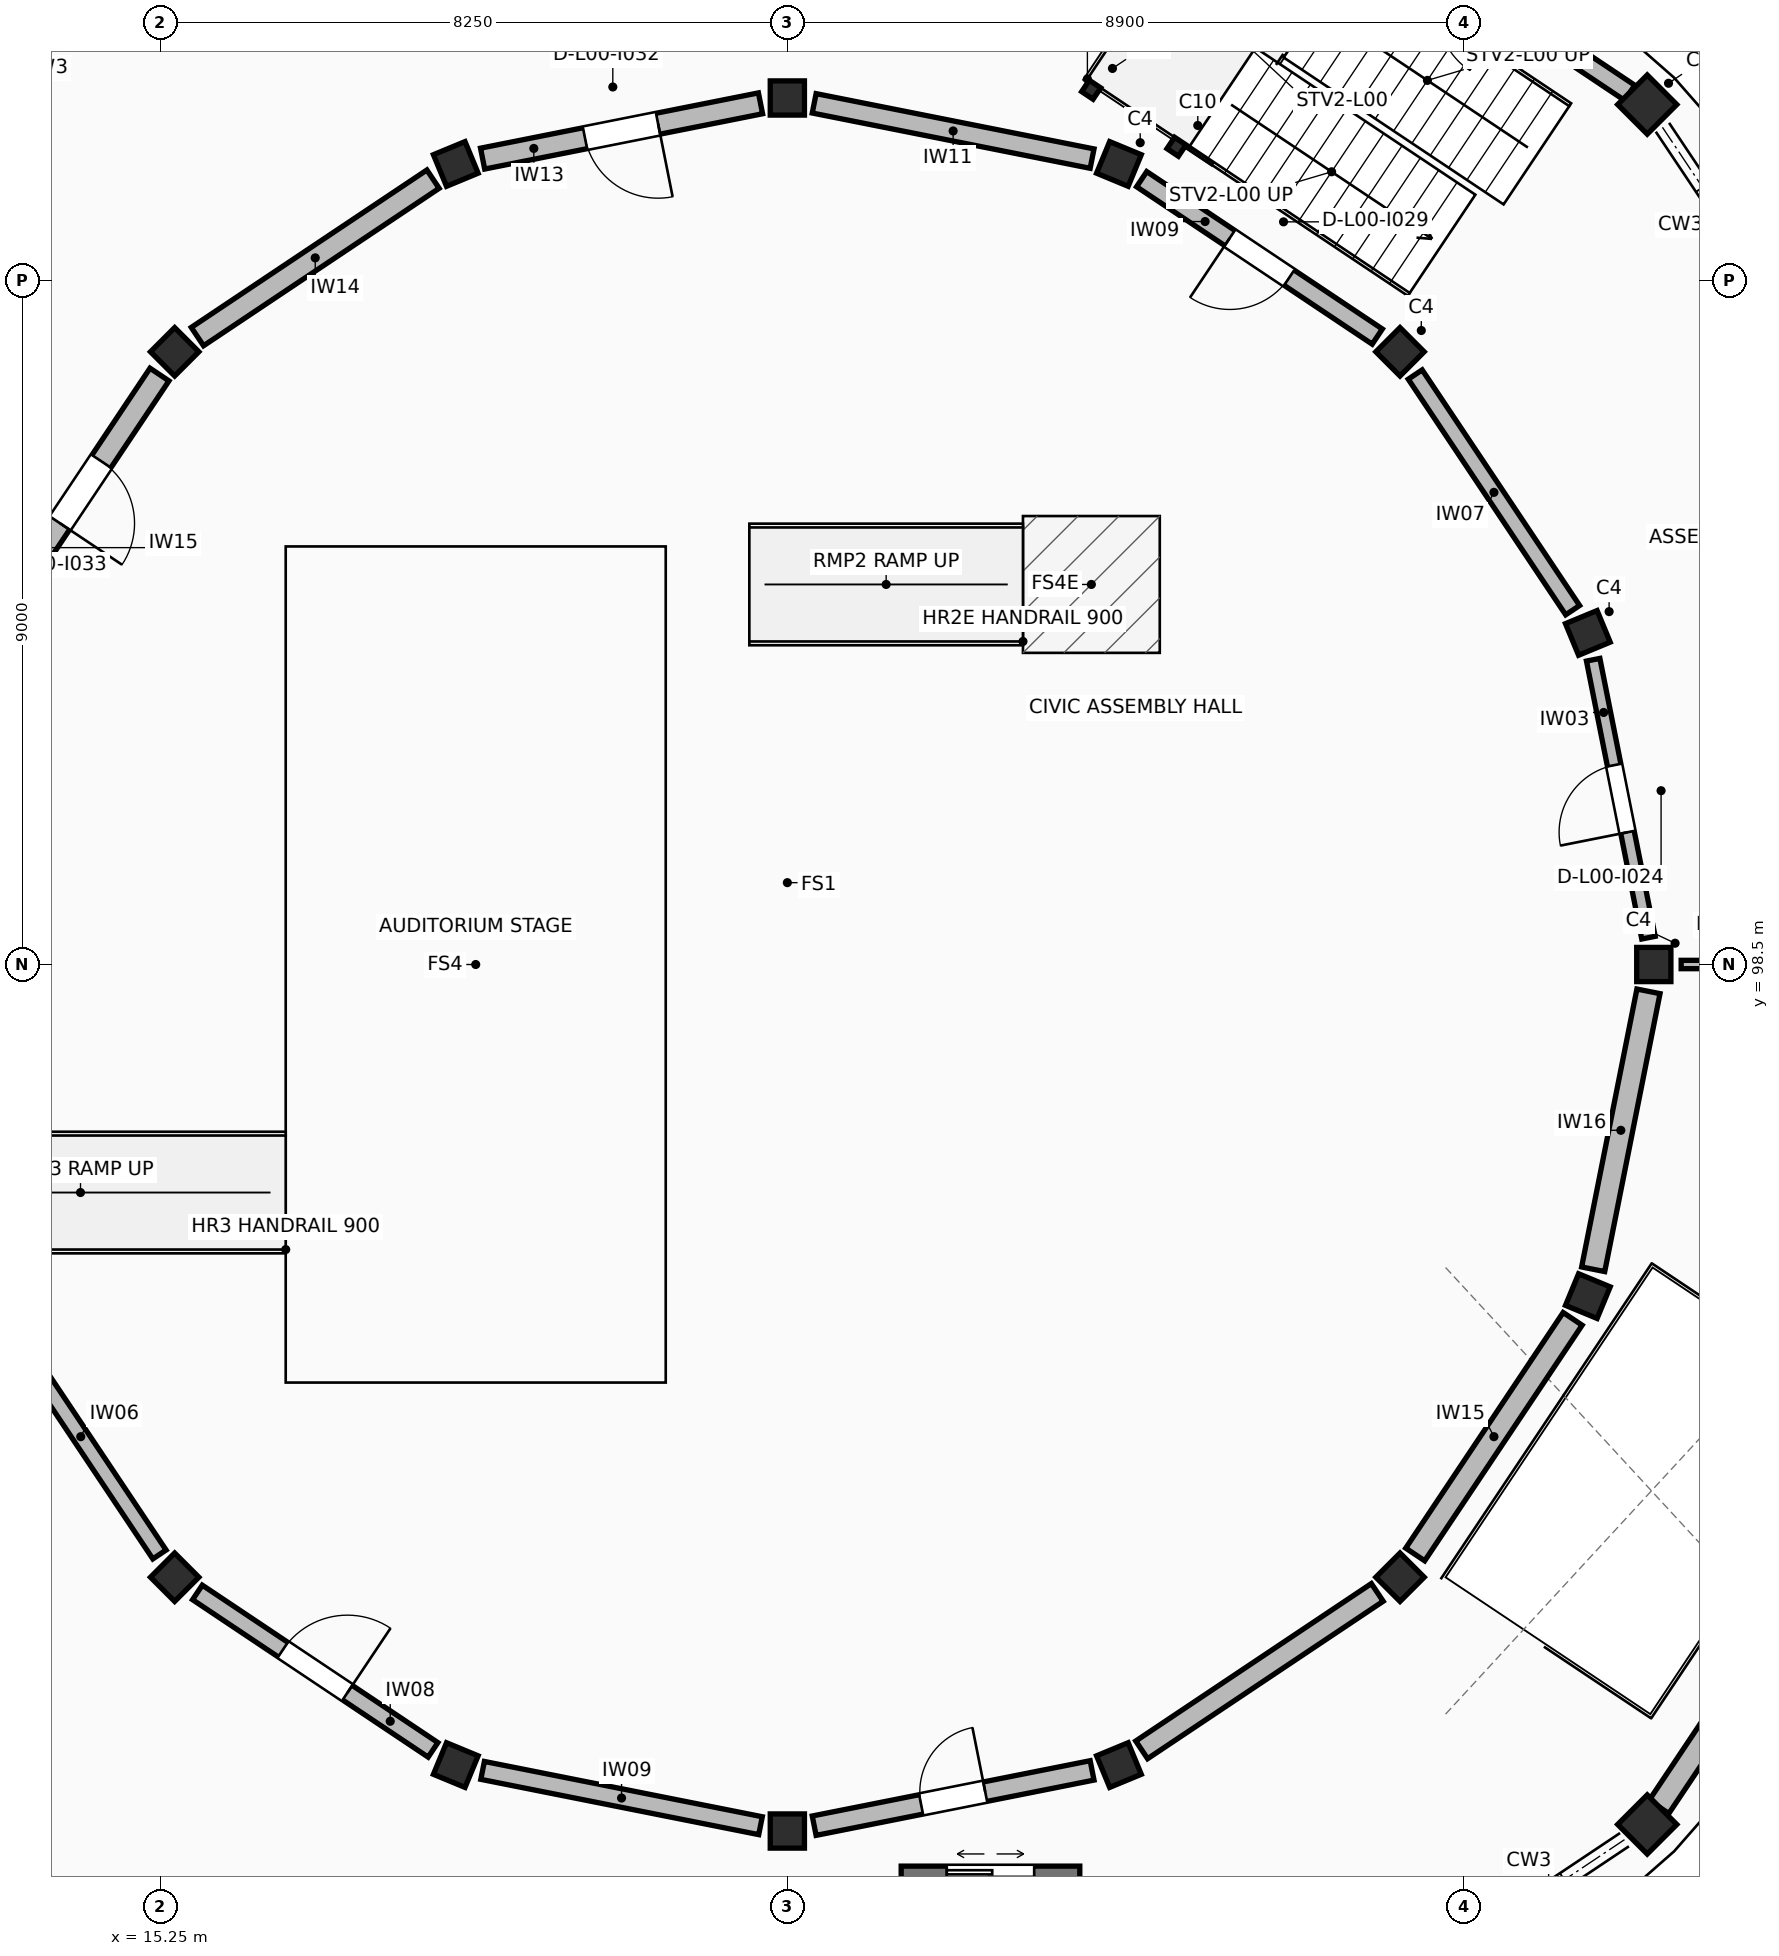
"""IFC4 building model, lengths in metres.
Left out: names, types, materials, properties, quantities, classifications, styles, units other than length and angle.
Written with IfcOpenShell. Run it as: python <this file> out.ifc"""

import sys

from ifc_helpers import new_model, si_unit, direction, frame, frame_2d, origin, origin_2d, place, context, subcontext, project, spatial, rectangle, hollow_rectangle, extrude, element, fill, save


model = new_model("IFC4")
c1 = context("Model", 3, precision=1e-05, world=origin(), true_north=direction((0.0, 1.0)))
c2 = subcontext(c1, "Body", "Model", "MODEL_VIEW")
j1 = project(units=[si_unit("LENGTHUNIT", "METRE"), si_unit("PLANEANGLEUNIT", "RADIAN")], contexts=[c1])
p1 = place(None, origin())
s1 = spatial("IfcSite", under=j1, at=p1, CompositionType="ELEMENT")
p2 = place(p1, origin())
s2 = spatial("IfcBuilding", under=s1, at=p2, CompositionType="ELEMENT")
p3 = place(p2, origin())
s3 = spatial("IfcBuildingStorey", under=s2, at=p3, CompositionType="ELEMENT", Elevation=0.0)
for number, where, z_axis, x_axis in (
    (1, (34.9, 98.5, 0.0), (0.0, 0.0, 1.0), (1.0, 0.0, 0.0)),
    (2, (34.032, 102.863, 0.0), (0.0, 0.0, 1.0), (0.924, 0.383, 0.0)),
    (3, (31.561, 106.561, 0.0), (0.0, 0.0, 1.0), (0.707, 0.707, 0.0)),
):
    element("IfcColumn", number, at=place(p3, frame(where, z_axis=z_axis, x_axis=x_axis)), inside=s3, PredefinedType="COLUMN", context=c2, shape_type="SweptSolid", body=[
        extrude(rectangle(XDim=0.45, YDim=0.45, at=origin_2d()), origin(), (0.0, 0.0, 1.0), 4.42),
    ])
p4 = place(p3, frame((34.814, 109.814, 0.0), z_axis=(0.0, 0.0, 1.0), x_axis=(0.707106781187, 0.707106781187, 0.0)))
e4 = element("IfcColumn", 4, at=p4, inside=s3, PredefinedType="COLUMN", context=c2, shape_type="SweptSolid", body=[
    extrude(rectangle(XDim=0.55, YDim=0.55, at=origin_2d()), origin(), (0.0, 0.0, 1.0), 4.42),
])
for number, where, z_axis, x_axis in (
    (5, (27.863, 109.032, 0.0), (0.0, 0.0, 1.0), (0.383, 0.924, 0.0)),
    (6, (23.5, 109.9, 0.0), (0.0, 0.0, 1.0), (0.0, 1.0, 0.0)),
    (7, (19.137, 109.032, 0.0), (0.0, 0.0, 1.0), (-0.383, 0.924, 0.0)),
    (8, (15.439, 106.561, 0.0), (0.0, 0.0, 1.0), (-0.707, 0.707, 0.0)),
    (9, (15.439, 90.439, 0.0), (0.0, 0.0, 1.0), (-0.707, -0.707, 0.0)),
    (10, (19.137, 87.968, 0.0), (0.0, 0.0, 1.0), (-0.383, -0.924, 0.0)),
    (11, (23.5, 87.1, 0.0), (0.0, 0.0, 1.0), (0.0, -1.0, 0.0)),
    (12, (27.863, 87.968, 0.0), (0.0, 0.0, 1.0), (0.383, -0.924, 0.0)),
    (13, (31.561, 90.439, 0.0), (0.0, 0.0, 1.0), (0.707, -0.707, 0.0)),
):
    element("IfcColumn", number, at=place(p3, frame(where, z_axis=z_axis, x_axis=x_axis)), inside=s3, PredefinedType="COLUMN", context=c2, shape_type="SweptSolid", body=[
        extrude(rectangle(XDim=0.45, YDim=0.45, at=origin_2d()), origin(), (0.0, 0.0, 1.0), 4.42),
    ])
p5 = place(p3, frame((34.814, 87.186, 0.0), z_axis=(0.0, 0.0, 1.0), x_axis=(0.707106781187, -0.707106781187, 0.0)))
e14 = element("IfcColumn", 14, at=p5, inside=s3, PredefinedType="COLUMN", context=c2, shape_type="SweptSolid", body=[
    extrude(rectangle(XDim=0.55, YDim=0.55, at=origin_2d()), origin(), (0.0, 0.0, 1.0), 4.42),
])
p6 = place(p3, frame((34.032, 94.137, 0.0), z_axis=(0.0, 0.0, 1.0), x_axis=(0.923879532511, -0.382683432365, 0.0)))
e15 = element("IfcColumn", 15, at=p6, inside=s3, PredefinedType="COLUMN", context=c2, shape_type="SweptSolid", body=[
    extrude(rectangle(XDim=0.45, YDim=0.45, at=origin_2d()), origin(), (0.0, 0.0, 1.0), 4.42),
])
p7 = place(p3, frame((24.998, 86.513, 0.0), z_axis=(0.0, 0.0, 1.0), x_axis=(1.0, 0.0, 0.0)))
e16 = element("IfcWall", 16, at=p7, inside=s3, PredefinedType="SHEAR", context=c2, shape_type="SweptSolid", body=[
    extrude(rectangle(XDim=2.35, YDim=0.25, at=frame_2d((1.175, 0.0))), origin(), (0.0, 0.0, 1.0), 4.2),
])
p8 = place(p7, frame((0.6, 0.0, 0.0)))
e17 = element("IfcOpeningElement", 17, at=p8, cuts=e16, PredefinedType="OPENING", context=c2, shape_type="SweptSolid", body=[
    extrude(rectangle(XDim=1.15, YDim=2.15, at=frame_2d((0.575, 1.075))), frame((0.0, 0.135, 0.0), z_axis=(0.0, -1.0, 0.0), x_axis=(1.0, 0.0, 0.0)), (0.0, 0.0, 1.0), 0.27),
])
p9 = place(p3, frame((34.583, 109.968, 0.0), z_axis=(0.0, 0.0, 1.0), x_axis=(-0.831475241541, 0.555561808177, 0.0)))
e18 = element("IfcWall", 18, at=p9, inside=s3, PredefinedType="STANDARD", context=c2, shape_type="SweptSolid", body=[
    extrude(rectangle(XDim=5.687, YDim=0.24, at=frame_2d((2.844, 0.0))), origin(), (0.0, 0.0, 1.0), 3.4),
])
p10 = place(p9, frame((1.918, 0.0, 0.0)))
e19 = element("IfcOpeningElement", 19, at=p10, cuts=e18, PredefinedType="OPENING", context=c2, shape_type="SweptSolid", body=[
    extrude(rectangle(XDim=1.85, YDim=2.28, at=frame_2d((0.925, 1.14))), frame((0.0, 0.13, 0.0), z_axis=(0.0, -1.0, 0.0), x_axis=(1.0, 0.0, 0.0)), (0.0, 0.0, 1.0), 0.26),
])
p11 = place(p3, frame((12.417, 87.032, 0.0), z_axis=(0.0, 0.0, 1.0), x_axis=(0.831475241541, -0.555561808177, 0.0)))
e20 = element("IfcWall", 20, at=p11, inside=s3, PredefinedType="STANDARD", context=c2, shape_type="SweptSolid", body=[
    extrude(rectangle(XDim=5.687, YDim=0.288, at=frame_2d((2.844, 0.0))), origin(), (0.0, 0.0, 1.0), 3.4),
])
p12 = place(p11, frame((2.168, 0.0, 0.0)))
e21 = element("IfcOpeningElement", 21, at=p12, cuts=e20, PredefinedType="OPENING", context=c2, shape_type="SweptSolid", body=[
    extrude(rectangle(XDim=1.35, YDim=2.2, at=frame_2d((0.675, 1.1))), frame((0.0, 0.154, 0.0), z_axis=(0.0, -1.0, 0.0), x_axis=(1.0, 0.0, 0.0)), (0.0, 0.0, 1.0), 0.308),
])
p13 = place(p3, frame((34.968, 87.417, 0.0), z_axis=(0.0, 0.0, 1.0), x_axis=(0.555561808177, 0.831475241541, 0.0)))
e22 = element("IfcWall", 22, at=p13, inside=s3, PredefinedType="STANDARD", context=c2, shape_type="SweptSolid", body=[
    extrude(rectangle(XDim=5.687, YDim=0.312, at=frame_2d((2.844, 0.0))), origin(), (0.0, 0.0, 1.0), 3.4),
])
p14 = place(p13, frame((2.118, 0.0, 0.0)))
e23 = element("IfcOpeningElement", 23, at=p14, cuts=e22, PredefinedType="OPENING", context=c2, shape_type="SweptSolid", body=[
    extrude(rectangle(XDim=1.45, YDim=2.22, at=frame_2d((0.725, 1.11))), frame((0.0, 0.166, 0.0), z_axis=(0.0, -1.0, 0.0), x_axis=(1.0, 0.0, 0.0)), (0.0, 0.0, 1.0), 0.332),
])
for number, where, z_axis, x_axis in (
    (24, (28.62, 109.259, 0.0), (0.0, 0.0, 1.0), (-0.831, 0.556, 0.0)),
    (25, (27.498, 110.009, 0.0), (0.0, 0.0, 1.0), (-0.831, 0.556, 0.0)),
):
    element("IfcColumn", number, at=place(p3, frame(where, z_axis=z_axis, x_axis=x_axis)), inside=s3, PredefinedType="COLUMN", context=c2, shape_type="SweptSolid", body=[
        extrude(hollow_rectangle(XDim=0.18, YDim=0.18, WallThickness=0.01, InnerFilletRadius=0.01, OuterFilletRadius=0.02, at=origin_2d()), origin(), (0.0, 0.0, 1.0), 2.015),
    ])
p15 = place(p3, frame((34.83, 98.853, 0.0), z_axis=(0.0, 0.0, 1.0), x_axis=(-0.195083359546, 0.980786665299, 0.0)))
e26 = element("IfcWall", 26, at=p15, inside=s3, PredefinedType="STANDARD", context=c2, shape_type="SweptSolid", body=[
    extrude(rectangle(XDim=3.728, YDim=0.18, at=frame_2d((1.864, 0.0))), origin(), (0.0, 0.0, 1.0), 3.38),
])
p16 = place(p15, frame((1.414, 0.0, 0.0)))
e27 = element("IfcOpeningElement", 27, at=p16, cuts=e26, PredefinedType="OPENING", context=c2, shape_type="SweptSolid", body=[
    extrude(rectangle(XDim=0.9, YDim=2.06, at=frame_2d((0.45, 1.03))), frame((0.0, 0.1, 0.0), z_axis=(0.0, -1.0, 0.0), x_axis=(1.0, 0.0, 0.0)), (0.0, 0.0, 1.0), 0.2),
])
p17 = place(p3, frame((35.26, 98.5, 0.0), z_axis=(0.0, 0.0, 1.0), x_axis=(1.0, 0.0, 0.0)))
e28 = element("IfcWall", 28, at=p17, inside=s3, PredefinedType="PARTITIONING", context=c2, shape_type="SweptSolid", body=[
    extrude(rectangle(XDim=3.43, YDim=0.11, at=frame_2d((1.715, 0.0))), origin(), (0.0, 0.0, 1.0), 3.38),
])
p18 = place(p17, frame((1.025, 0.0, 0.0)))
e29 = element("IfcOpeningElement", 29, at=p18, cuts=e28, PredefinedType="OPENING", context=c2, shape_type="SweptSolid", body=[
    extrude(rectangle(XDim=1.38, YDim=2.18, at=frame_2d((0.69, 1.09))), frame((0.0, 0.065, 0.0), z_axis=(0.0, -1.0, 0.0), x_axis=(1.0, 0.0, 0.0)), (0.0, 0.0, 1.0), 0.13),
])
p19 = place(p3, frame((33.832, 103.162, 0.0), z_axis=(0.0, 0.0, 1.0), x_axis=(-0.555576382584, 0.831465503262, 0.0)))
e30 = element("IfcWall", 30, at=p19, inside=s3, PredefinedType="STANDARD", context=c2, shape_type="SweptSolid", body=[
    extrude(rectangle(XDim=3.728, YDim=0.22, at=frame_2d((1.864, 0.0))), origin(), (0.0, 0.0, 1.0), 3.38),
])
p20 = place(p3, frame((31.262, 106.761, 0.0), z_axis=(0.0, 0.0, 1.0), x_axis=(-0.831465503262, 0.555576382584, 0.0)))
e31 = element("IfcWall", 31, at=p20, inside=s3, PredefinedType="STANDARD", context=c2, shape_type="SweptSolid", body=[
    extrude(rectangle(XDim=3.728, YDim=0.24, at=frame_2d((1.864, 0.0))), origin(), (0.0, 0.0, 1.0), 3.38),
])
p21 = place(p20, frame((1.394, 0.0, 0.0)))
e32 = element("IfcOpeningElement", 32, at=p21, cuts=e31, PredefinedType="OPENING", context=c2, shape_type="SweptSolid", body=[
    extrude(rectangle(XDim=0.94, YDim=2.12, at=frame_2d((0.47, 1.06))), frame((0.0, 0.13, 0.0), z_axis=(0.0, -1.0, 0.0), x_axis=(1.0, 0.0, 0.0)), (0.0, 0.0, 1.0), 0.26),
])
p22 = place(p3, frame((27.51, 109.103, 0.0), z_axis=(0.0, 0.0, 1.0), x_axis=(-0.980786665299, 0.195083359546, 0.0)))
e33 = element("IfcWall", 33, at=p22, inside=s3, PredefinedType="STANDARD", context=c2, shape_type="SweptSolid", body=[
    extrude(rectangle(XDim=3.728, YDim=0.26, at=frame_2d((1.864, 0.0))), origin(), (0.0, 0.0, 1.0), 3.38),
])
p23 = place(p3, frame((23.147, 109.83, 0.0), z_axis=(0.0, 0.0, 1.0), x_axis=(-0.980786665299, -0.195083359546, 0.0)))
e34 = element("IfcWall", 34, at=p23, inside=s3, PredefinedType="STANDARD", context=c2, shape_type="SweptSolid", body=[
    extrude(rectangle(XDim=3.728, YDim=0.28, at=frame_2d((1.864, 0.0))), origin(), (0.0, 0.0, 1.0), 3.38),
])
p24 = place(p23, frame((1.374, 0.0, 0.0)))
e35 = element("IfcOpeningElement", 35, at=p24, cuts=e34, PredefinedType="OPENING", context=c2, shape_type="SweptSolid", body=[
    extrude(rectangle(XDim=0.98, YDim=2.06, at=frame_2d((0.49, 1.03))), frame((0.0, 0.15, 0.0), z_axis=(0.0, -1.0, 0.0), x_axis=(1.0, 0.0, 0.0)), (0.0, 0.0, 1.0), 0.3),
])
p25 = place(p3, frame((18.838, 108.832, 0.0), z_axis=(0.0, 0.0, 1.0), x_axis=(-0.831465503262, -0.555576382584, 0.0)))
e36 = element("IfcWall", 36, at=p25, inside=s3, PredefinedType="STANDARD", context=c2, shape_type="SweptSolid", body=[
    extrude(rectangle(XDim=3.728, YDim=0.29, at=frame_2d((1.864, 0.0))), origin(), (0.0, 0.0, 1.0), 3.38),
])
p26 = place(p3, frame((15.239, 106.262, 0.0), z_axis=(0.0, 0.0, 1.0), x_axis=(-0.555576382584, -0.831465503262, 0.0)))
e37 = element("IfcWall", 37, at=p26, inside=s3, PredefinedType="STANDARD", context=c2, shape_type="SweptSolid", body=[
    extrude(rectangle(XDim=3.728, YDim=0.3, at=frame_2d((1.864, 0.0))), origin(), (0.0, 0.0, 1.0), 3.38),
])
p27 = place(p26, frame((1.374, 0.0, 0.0)))
e38 = element("IfcOpeningElement", 38, at=p27, cuts=e37, PredefinedType="OPENING", context=c2, shape_type="SweptSolid", body=[
    extrude(rectangle(XDim=0.98, YDim=2.12, at=frame_2d((0.49, 1.06))), frame((0.0, 0.16, 0.0), z_axis=(0.0, -1.0, 0.0), x_axis=(1.0, 0.0, 0.0)), (0.0, 0.0, 1.0), 0.32),
])
p28 = place(p3, frame((13.168, 93.838, 0.0), z_axis=(0.0, 0.0, 1.0), x_axis=(0.555576382584, -0.831465503262, 0.0)))
e39 = element("IfcWall", 39, at=p28, inside=s3, PredefinedType="STANDARD", context=c2, shape_type="SweptSolid", body=[
    extrude(rectangle(XDim=3.728, YDim=0.21, at=frame_2d((1.864, 0.0))), origin(), (0.0, 0.0, 1.0), 3.38),
])
p29 = place(p3, frame((15.738, 90.239, 0.0), z_axis=(0.0, 0.0, 1.0), x_axis=(0.831465503262, -0.555576382584, 0.0)))
e40 = element("IfcWall", 40, at=p29, inside=s3, PredefinedType="STANDARD", context=c2, shape_type="SweptSolid", body=[
    extrude(rectangle(XDim=3.728, YDim=0.23, at=frame_2d((1.864, 0.0))), origin(), (0.0, 0.0, 1.0), 3.38),
])
p30 = place(p29, frame((1.354, 0.0, 0.0)))
e41 = element("IfcOpeningElement", 41, at=p30, cuts=e40, PredefinedType="OPENING", context=c2, shape_type="SweptSolid", body=[
    extrude(rectangle(XDim=1.02, YDim=2.24, at=frame_2d((0.51, 1.12))), frame((0.0, 0.125, 0.0), z_axis=(0.0, -1.0, 0.0), x_axis=(1.0, 0.0, 0.0)), (0.0, 0.0, 1.0), 0.25),
])
p31 = place(p3, frame((19.49, 87.897, 0.0), z_axis=(0.0, 0.0, 1.0), x_axis=(0.980786665299, -0.195083359546, 0.0)))
e42 = element("IfcWall", 42, at=p31, inside=s3, PredefinedType="STANDARD", context=c2, shape_type="SweptSolid", body=[
    extrude(rectangle(XDim=3.728, YDim=0.24, at=frame_2d((1.864, 0.0))), origin(), (0.0, 0.0, 1.0), 3.38),
])
p32 = place(p3, frame((23.853, 87.17, 0.0), z_axis=(0.0, 0.0, 1.0), x_axis=(0.980786665299, 0.195083359546, 0.0)))
e43 = element("IfcWall", 43, at=p32, inside=s3, PredefinedType="STANDARD", context=c2, shape_type="SweptSolid", body=[
    extrude(rectangle(XDim=3.728, YDim=0.26, at=frame_2d((1.864, 0.0))), origin(), (0.0, 0.0, 1.0), 3.38),
])
p33 = place(p32, frame((1.434, 0.0, 0.0)))
e44 = element("IfcOpeningElement", 44, at=p33, cuts=e43, PredefinedType="OPENING", context=c2, shape_type="SweptSolid", body=[
    extrude(rectangle(XDim=0.86, YDim=2.12, at=frame_2d((0.43, 1.06))), frame((0.0, 0.14, 0.0), z_axis=(0.0, -1.0, 0.0), x_axis=(1.0, 0.0, 0.0)), (0.0, 0.0, 1.0), 0.28),
])
p34 = place(p3, frame((28.162, 88.168, 0.0), z_axis=(0.0, 0.0, 1.0), x_axis=(0.831465503262, 0.555576382584, 0.0)))
e45 = element("IfcWall", 45, at=p34, inside=s3, PredefinedType="STANDARD", context=c2, shape_type="SweptSolid", body=[
    extrude(rectangle(XDim=3.728, YDim=0.28, at=frame_2d((1.864, 0.0))), origin(), (0.0, 0.0, 1.0), 3.38),
])
p35 = place(p3, frame((31.761, 90.738, 0.0), z_axis=(0.0, 0.0, 1.0), x_axis=(0.555576382584, 0.831465503262, 0.0)))
e46 = element("IfcWall", 46, at=p35, inside=s3, PredefinedType="STANDARD", context=c2, shape_type="SweptSolid", body=[
    extrude(rectangle(XDim=3.728, YDim=0.3, at=frame_2d((1.864, 0.0))), origin(), (0.0, 0.0, 1.0), 3.38),
])
p36 = place(p3, frame((34.103, 94.49, 0.0), z_axis=(0.0, 0.0, 1.0), x_axis=(0.195083359546, 0.980786665299, 0.0)))
e47 = element("IfcWall", 47, at=p36, inside=s3, PredefinedType="STANDARD", context=c2, shape_type="SweptSolid", body=[
    extrude(rectangle(XDim=3.728, YDim=0.31, at=frame_2d((1.864, 0.0))), origin(), (0.0, 0.0, 1.0), 3.38),
])
p37 = place(p8, origin())
e48 = element("IfcDoor", 48, at=p37, inside=s3, OperationType="DOUBLE_DOOR_SLIDING", PredefinedType="DOOR", context=c2, shape_type="SweptSolid", body=[
    extrude(rectangle(XDim=1.15, YDim=2.15, at=frame_2d((0.575, 1.075))), frame((0.0, 0.025, 0.0), z_axis=(0.0, -1.0, 0.0), x_axis=(1.0, 0.0, 0.0)), (0.0, 0.0, 1.0), 0.05),
])
fill(e17, e48)
p38 = place(p16, frame((0.9, 0.0, 0.0), z_axis=(0.0, 0.0, 1.0), x_axis=(-1.0, 0.0, 0.0)))
e49 = element("IfcDoor", 49, at=p38, inside=s3, OperationType="SINGLE_SWING_LEFT", PredefinedType="DOOR", context=c2, shape_type="SweptSolid", body=[
    extrude(rectangle(XDim=0.9, YDim=2.06, at=frame_2d((0.45, 1.03))), frame((0.0, 0.025, 0.0), z_axis=(0.0, -1.0, 0.0), x_axis=(1.0, 0.0, 0.0)), (0.0, 0.0, 1.0), 0.05),
])
fill(e27, e49)
p39 = place(p21, frame((0.94, 0.0, 0.0), z_axis=(0.0, 0.0, 1.0), x_axis=(-1.0, 0.0, 0.0)))
e50 = element("IfcDoor", 50, at=p39, inside=s3, OperationType="SINGLE_SWING_RIGHT", PredefinedType="DOOR", context=c2, shape_type="SweptSolid", body=[
    extrude(rectangle(XDim=0.94, YDim=2.12, at=frame_2d((0.47, 1.06))), frame((0.0, 0.025, 0.0), z_axis=(0.0, -1.0, 0.0), x_axis=(1.0, 0.0, 0.0)), (0.0, 0.0, 1.0), 0.05),
])
fill(e32, e50)
p40 = place(p24, frame((0.98, 0.0, 0.0), z_axis=(0.0, 0.0, 1.0), x_axis=(-1.0, 0.0, 0.0)))
e51 = element("IfcDoor", 51, at=p40, inside=s3, OperationType="SINGLE_SWING_LEFT", PredefinedType="DOOR", context=c2, shape_type="SweptSolid", body=[
    extrude(rectangle(XDim=0.98, YDim=2.06, at=frame_2d((0.49, 1.03))), frame((0.0, 0.025, 0.0), z_axis=(0.0, -1.0, 0.0), x_axis=(1.0, 0.0, 0.0)), (0.0, 0.0, 1.0), 0.05),
])
fill(e35, e51)
p41 = place(p27, frame((0.98, 0.0, 0.0), z_axis=(0.0, 0.0, 1.0), x_axis=(-1.0, 0.0, 0.0)))
e52 = element("IfcDoor", 52, at=p41, inside=s3, OperationType="SINGLE_SWING_RIGHT", PredefinedType="DOOR", context=c2, shape_type="SweptSolid", body=[
    extrude(rectangle(XDim=0.98, YDim=2.12, at=frame_2d((0.49, 1.06))), frame((0.0, 0.025, 0.0), z_axis=(0.0, -1.0, 0.0), x_axis=(1.0, 0.0, 0.0)), (0.0, 0.0, 1.0), 0.05),
])
fill(e38, e52)
p42 = place(p30, frame((1.02, 0.0, 0.0), z_axis=(0.0, 0.0, 1.0), x_axis=(-1.0, 0.0, 0.0)))
e53 = element("IfcDoor", 53, at=p42, inside=s3, OperationType="SINGLE_SWING_RIGHT", PredefinedType="DOOR", context=c2, shape_type="SweptSolid", body=[
    extrude(rectangle(XDim=1.02, YDim=2.24, at=frame_2d((0.51, 1.12))), frame((0.0, 0.025, 0.0), z_axis=(0.0, -1.0, 0.0), x_axis=(1.0, 0.0, 0.0)), (0.0, 0.0, 1.0), 0.05),
])
fill(e41, e53)
p43 = place(p33, frame((0.86, 0.0, 0.0), z_axis=(0.0, 0.0, 1.0), x_axis=(-1.0, 0.0, 0.0)))
e54 = element("IfcDoor", 54, at=p43, inside=s3, OperationType="SINGLE_SWING_RIGHT", PredefinedType="DOOR", context=c2, shape_type="SweptSolid", body=[
    extrude(rectangle(XDim=0.86, YDim=2.12, at=frame_2d((0.43, 1.06))), frame((0.0, 0.025, 0.0), z_axis=(0.0, -1.0, 0.0), x_axis=(1.0, 0.0, 0.0)), (0.0, 0.0, 1.0), 0.05),
])
fill(e44, e54)
save(model, sys.argv[1])
